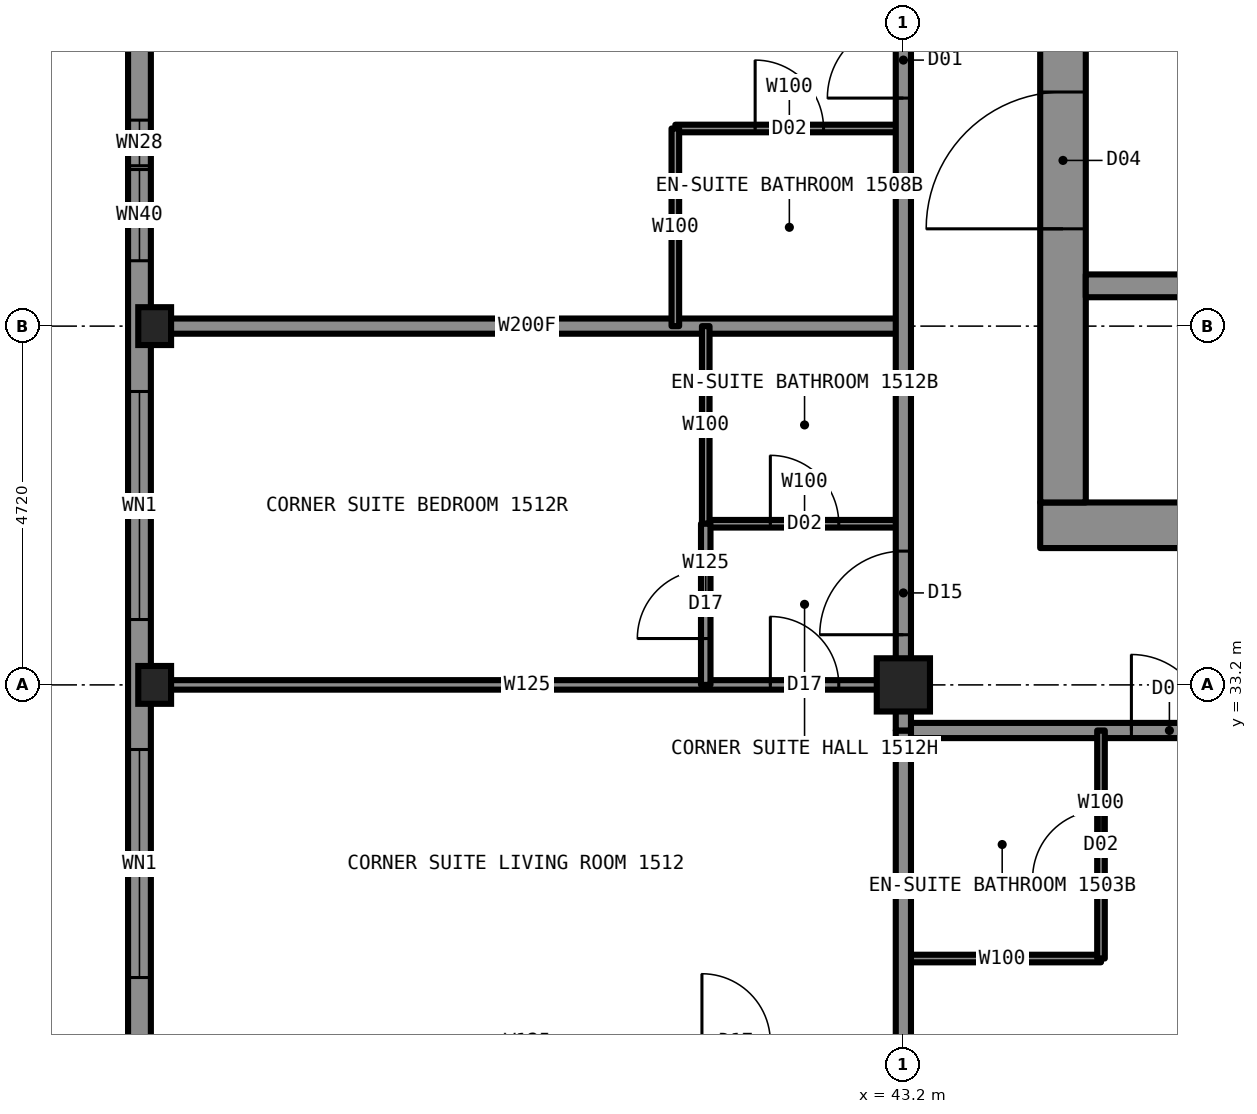
"""IFC4 building model, lengths in metres.
Left out: names, types, materials, properties, quantities, classifications, styles, units other than length and angle.
Written with IfcOpenShell. Run it as: python <this file> out.ifc"""

import sys

from ifc_helpers import new_model, si_unit, direction, frame, frame_2d, origin, origin_2d, place, context, subcontext, project, spatial, rectangle, hollow_rectangle, i_section, extrude, element, fill, save


model = new_model("IFC4")
c1 = context("Model", 3, precision=1e-05, world=origin(), true_north=direction((0.0, 1.0)))
c2 = subcontext(c1, "Body", "Model", "MODEL_VIEW")
j1 = project(units=[si_unit("LENGTHUNIT", "METRE"), si_unit("PLANEANGLEUNIT", "RADIAN")], contexts=[c1])
p1 = place(None, origin())
s1 = spatial("IfcSite", under=j1, at=p1, CompositionType="ELEMENT")
p2 = place(p1, origin())
s2 = spatial("IfcBuilding", under=s1, at=p2, CompositionType="ELEMENT")
p3 = place(p2, frame((0.0, 0.0, 60.0)))
s3 = spatial("IfcBuildingStorey", under=s2, at=p3, CompositionType="ELEMENT", Elevation=60.0)
for number, where, z_axis, x_axis in (
    (1, (33.35, 33.2, 0.0), (0.0, 0.0, 1.0), (1.0, 0.0, 0.0)),
    (2, (33.35, 37.92, 0.0), (0.0, 0.0, 1.0), (1.0, 0.0, 0.0)),
):
    element("IfcColumn", number, at=place(p3, frame(where, z_axis=z_axis, x_axis=x_axis)), inside=s3, PredefinedType="COLUMN", context=c2, shape_type="SweptSolid", body=[
        extrude(i_section(OverallWidth=0.432, OverallDepth=0.498, WebThickness=0.056, FlangeThickness=0.089, at=origin_2d()), origin(), (0.0, 0.0, 1.0), 3.5),
    ])
p4 = place(p3, frame((43.2, 33.2, 0.0), z_axis=(0.0, 0.0, 1.0), x_axis=(1.0, 0.0, 0.0)))
e3 = element("IfcColumn", 3, at=p4, inside=s3, PredefinedType="COLUMN", context=c2, shape_type="SweptSolid", body=[
    extrude(hollow_rectangle(XDim=0.7, YDim=0.7, WallThickness=0.06, at=origin_2d()), origin(), (0.0, 0.0, 1.0), 3.5),
])
p5 = place(p3, frame((45.0, 35.3, 0.0), z_axis=(0.0, 0.0, 1.0), x_axis=(1.0, 0.0, 0.0)))
e4 = element("IfcWall", 4, at=p5, inside=s3, PredefinedType="SHEAR", context=c2, shape_type="SweptSolid", body=[
    extrude(rectangle(XDim=20.0, YDim=0.6, at=frame_2d((10.0, 0.0))), origin(), (0.0, 0.0, 1.0), 3.5),
])
p6 = place(p3, frame((45.3, 35.6, 0.0), z_axis=(0.0, 0.0, 1.0), x_axis=(0.0, 1.0, 0.0)))
e5 = element("IfcWall", 5, at=p6, inside=s3, PredefinedType="SHEAR", context=c2, shape_type="SweptSolid", body=[
    extrude(rectangle(XDim=18.8, YDim=0.6, at=frame_2d((9.4, 0.0))), origin(), (0.0, 0.0, 1.0), 3.5),
])
p7 = place(p6, frame((13.4, 0.0, 0.0)))
e6 = element("IfcOpeningElement", 6, at=p7, cuts=e5, PredefinedType="OPENING", context=c2, shape_type="SweptSolid", body=[
    extrude(rectangle(XDim=1.8, YDim=2.2, at=frame_2d((0.9, 1.1))), frame((0.0, 0.31, 0.0), z_axis=(0.0, -1.0, 0.0), x_axis=(1.0, 0.0, 0.0)), (0.0, 0.0, 1.0), 0.62),
])
p8 = place(p6, frame((3.6, 0.0, 0.0)))
e7 = element("IfcOpeningElement", 7, at=p8, cuts=e5, PredefinedType="OPENING", context=c2, shape_type="SweptSolid", body=[
    extrude(rectangle(XDim=1.8, YDim=2.2, at=frame_2d((0.9, 1.1))), frame((0.0, 0.31, 0.0), z_axis=(0.0, -1.0, 0.0), x_axis=(1.0, 0.0, 0.0)), (0.0, 0.0, 1.0), 0.62),
])
p9 = place(p6, frame((6.4, 0.0, 0.0)))
e8 = element("IfcOpeningElement", 8, at=p9, cuts=e5, PredefinedType="OPENING", context=c2, shape_type="SweptSolid", body=[
    extrude(rectangle(XDim=1.2, YDim=2.2, at=frame_2d((0.6, 1.1))), frame((0.0, 0.31, 0.0), z_axis=(0.0, -1.0, 0.0), x_axis=(1.0, 0.0, 0.0)), (0.0, 0.0, 1.0), 0.62),
])
p10 = place(p3, frame((45.6, 38.45, 0.0), z_axis=(0.0, 0.0, 1.0), x_axis=(1.0, 0.0, 0.0)))
e9 = element("IfcWall", 9, at=p10, inside=s3, PredefinedType="SHEAR", context=c2, shape_type="SweptSolid", body=[
    extrude(rectangle(XDim=18.8, YDim=0.3, at=frame_2d((9.4, 0.0))), origin(), (0.0, 0.0, 1.0), 3.5),
])
p11 = place(p3, frame((33.3, 33.2, 0.0), z_axis=(0.0, 0.0, 1.0), x_axis=(1.0, 0.0, 0.0)))
e10 = element("IfcWall", 10, at=p11, inside=s3, PredefinedType="PARTITIONING", context=c2, shape_type="SweptSolid", body=[
    extrude(rectangle(XDim=9.9, YDim=0.125, at=frame_2d((4.95, 0.0))), origin(), (0.0, 0.0, 1.0), 2.573),
])
p12 = place(p11, frame((8.15, 0.0, 0.0)))
e11 = element("IfcOpeningElement", 11, at=p12, cuts=e10, PredefinedType="OPENING", context=c2, shape_type="SweptSolid", body=[
    extrude(rectangle(XDim=0.9, YDim=2.2, at=frame_2d((0.45, 1.1))), frame((0.0, 0.073, 0.0), z_axis=(0.0, -1.0, 0.0), x_axis=(1.0, 0.0, 0.0)), (0.0, 0.0, 1.0), 0.145),
])
p13 = place(p3, frame((43.2, 32.6, 0.0), z_axis=(0.0, 0.0, 1.0), x_axis=(1.0, 0.0, 0.0)))
e12 = element("IfcWall", 12, at=p13, inside=s3, PredefinedType="PARTITIONING", context=c2, shape_type="SweptSolid", body=[
    extrude(rectangle(XDim=23.6, YDim=0.2, at=frame_2d((11.8, 0.0))), origin(), (0.0, 0.0, 1.0), 3.33),
])
p14 = place(p13, frame((3.0, 0.0, 0.0)))
e13 = element("IfcOpeningElement", 13, at=p14, cuts=e12, PredefinedType="OPENING", context=c2, shape_type="SweptSolid", body=[
    extrude(rectangle(XDim=1.0, YDim=2.2, at=frame_2d((0.5, 1.1))), frame((0.0, 0.11, 0.0), z_axis=(0.0, -1.0, 0.0), x_axis=(1.0, 0.0, 0.0)), (0.0, 0.0, 1.0), 0.22),
])
p15 = place(p13, frame((12.44, 0.0, 0.0)))
e14 = element("IfcOpeningElement", 14, at=p15, cuts=e12, PredefinedType="OPENING", context=c2, shape_type="SweptSolid", body=[
    extrude(rectangle(XDim=1.0, YDim=2.2, at=frame_2d((0.5, 1.1))), frame((0.0, 0.11, 0.0), z_axis=(0.0, -1.0, 0.0), x_axis=(1.0, 0.0, 0.0)), (0.0, 0.0, 1.0), 0.22),
])
p16 = place(p13, frame((20.34, 0.0, 0.0)))
e15 = element("IfcOpeningElement", 15, at=p16, cuts=e12, PredefinedType="OPENING", context=c2, shape_type="SweptSolid", body=[
    extrude(rectangle(XDim=1.0, YDim=2.2, at=frame_2d((0.5, 1.1))), frame((0.0, 0.11, 0.0), z_axis=(0.0, -1.0, 0.0), x_axis=(1.0, 0.0, 0.0)), (0.0, 0.0, 1.0), 0.22),
])
p17 = place(p3, frame((43.2, 29.6, 0.0), z_axis=(0.0, 0.0, 1.0), x_axis=(1.0, 0.0, 0.0)))
e16 = element("IfcWall", 16, at=p17, inside=s3, PredefinedType="PARTITIONING", context=c2, shape_type="SweptSolid", body=[
    extrude(rectangle(XDim=2.6, YDim=0.1, at=frame_2d((1.3, 0.0))), origin(), (0.0, 0.0, 1.0), 3.33),
])
p18 = place(p3, frame((40.2, 40.52, 0.0), z_axis=(0.0, 0.0, 1.0), x_axis=(1.0, 0.0, 0.0)))
e17 = element("IfcWall", 17, at=p18, inside=s3, PredefinedType="PARTITIONING", context=c2, shape_type="SweptSolid", body=[
    extrude(rectangle(XDim=3.0, YDim=0.1, at=frame_2d((1.5, 0.0))), origin(), (0.0, 0.0, 1.0), 3.33),
])
p19 = place(p18, frame((1.05, 0.0, 0.0)))
e18 = element("IfcOpeningElement", 18, at=p19, cuts=e17, PredefinedType="OPENING", context=c2, shape_type="SweptSolid", body=[
    extrude(rectangle(XDim=0.9, YDim=2.1, at=frame_2d((0.45, 1.05))), frame((0.0, 0.06, 0.0), z_axis=(0.0, -1.0, 0.0), x_axis=(1.0, 0.0, 0.0)), (0.0, 0.0, 1.0), 0.12),
])
p20 = place(p3, frame((33.3, 37.92, 0.0), z_axis=(0.0, 0.0, 1.0), x_axis=(1.0, 0.0, 0.0)))
e19 = element("IfcWall", 19, at=p20, inside=s3, PredefinedType="PARTITIONING", context=c2, shape_type="SweptSolid", body=[
    extrude(rectangle(XDim=9.9, YDim=0.2, at=frame_2d((4.95, 0.0))), origin(), (0.0, 0.0, 1.0), 2.573),
])
p21 = place(p3, frame((40.6, 35.32, 0.0), z_axis=(0.0, 0.0, 1.0), x_axis=(1.0, 0.0, 0.0)))
e20 = element("IfcWall", 20, at=p21, inside=s3, PredefinedType="PARTITIONING", context=c2, shape_type="SweptSolid", body=[
    extrude(rectangle(XDim=2.6, YDim=0.1, at=frame_2d((1.3, 0.0))), origin(), (0.0, 0.0, 1.0), 3.33),
])
p22 = place(p21, frame((0.85, 0.0, 0.0)))
e21 = element("IfcOpeningElement", 21, at=p22, cuts=e20, PredefinedType="OPENING", context=c2, shape_type="SweptSolid", body=[
    extrude(rectangle(XDim=0.9, YDim=2.1, at=frame_2d((0.45, 1.05))), frame((0.0, 0.06, 0.0), z_axis=(0.0, -1.0, 0.0), x_axis=(1.0, 0.0, 0.0)), (0.0, 0.0, 1.0), 0.12),
])
p23 = place(p3, frame((43.2, 33.22, 0.0), z_axis=(0.0, 0.0, 1.0), x_axis=(0.0, 1.0, 0.0)))
e22 = element("IfcWall", 22, at=p23, inside=s3, PredefinedType="PARTITIONING", context=c2, shape_type="SweptSolid", body=[
    extrude(rectangle(XDim=23.58, YDim=0.2, at=frame_2d((11.79, 0.0))), origin(), (0.0, 0.0, 1.0), 3.33),
])
p24 = place(p23, frame((7.7, 0.0, 0.0)))
e23 = element("IfcOpeningElement", 23, at=p24, cuts=e22, PredefinedType="OPENING", context=c2, shape_type="SweptSolid", body=[
    extrude(rectangle(XDim=1.0, YDim=2.2, at=frame_2d((0.5, 1.1))), frame((0.0, 0.11, 0.0), z_axis=(0.0, -1.0, 0.0), x_axis=(1.0, 0.0, 0.0)), (0.0, 0.0, 1.0), 0.22),
])
p25 = place(p23, frame((16.4, 0.0, 0.0)))
e24 = element("IfcOpeningElement", 24, at=p25, cuts=e22, PredefinedType="OPENING", context=c2, shape_type="SweptSolid", body=[
    extrude(rectangle(XDim=1.0, YDim=2.2, at=frame_2d((0.5, 1.1))), frame((0.0, 0.11, 0.0), z_axis=(0.0, -1.0, 0.0), x_axis=(1.0, 0.0, 0.0)), (0.0, 0.0, 1.0), 0.22),
])
p26 = place(p23, frame((21.82, 0.0, 0.0)))
e25 = element("IfcOpeningElement", 25, at=p26, cuts=e22, PredefinedType="OPENING", context=c2, shape_type="SweptSolid", body=[
    extrude(rectangle(XDim=1.1, YDim=2.2, at=frame_2d((0.55, 1.1))), frame((0.0, 0.11, 0.0), z_axis=(0.0, -1.0, 0.0), x_axis=(1.0, 0.0, 0.0)), (0.0, 0.0, 1.0), 0.22),
])
p27 = place(p23, frame((0.64, 0.0, 0.0)))
e26 = element("IfcOpeningElement", 26, at=p27, cuts=e22, PredefinedType="OPENING", context=c2, shape_type="SweptSolid", body=[
    extrude(rectangle(XDim=1.1, YDim=2.2, at=frame_2d((0.55, 1.1))), frame((0.0, 0.11, 0.0), z_axis=(0.0, -1.0, 0.0), x_axis=(1.0, 0.0, 0.0)), (0.0, 0.0, 1.0), 0.22),
])
p28 = place(p3, frame((43.2, 23.3, 0.0), z_axis=(0.0, 0.0, 1.0), x_axis=(0.0, 1.0, 0.0)))
e27 = element("IfcWall", 27, at=p28, inside=s3, PredefinedType="PARTITIONING", context=c2, shape_type="SweptSolid", body=[
    extrude(rectangle(XDim=9.3, YDim=0.2, at=frame_2d((4.65, 0.0))), origin(), (0.0, 0.0, 1.0), 2.573),
])
p29 = place(p3, frame((40.6, 35.32, 0.0), z_axis=(0.0, 0.0, 1.0), x_axis=(0.0, 1.0, 0.0)))
e28 = element("IfcWall", 28, at=p29, inside=s3, PredefinedType="PARTITIONING", context=c2, shape_type="SweptSolid", body=[
    extrude(rectangle(XDim=2.6, YDim=0.1, at=frame_2d((1.3, 0.0))), origin(), (0.0, 0.0, 1.0), 3.33),
])
p30 = place(p3, frame((40.6, 33.2, 0.0), z_axis=(0.0, 0.0, 1.0), x_axis=(0.0, 1.0, 0.0)))
e29 = element("IfcWall", 29, at=p30, inside=s3, PredefinedType="PARTITIONING", context=c2, shape_type="SweptSolid", body=[
    extrude(rectangle(XDim=2.12, YDim=0.125, at=frame_2d((1.06, 0.0))), origin(), (0.0, 0.0, 1.0), 3.33),
])
p31 = place(p30, frame((0.61, 0.0, 0.0)))
e30 = element("IfcOpeningElement", 30, at=p31, cuts=e29, PredefinedType="OPENING", context=c2, shape_type="SweptSolid", body=[
    extrude(rectangle(XDim=0.9, YDim=2.2, at=frame_2d((0.45, 1.1))), frame((0.0, 0.073, 0.0), z_axis=(0.0, -1.0, 0.0), x_axis=(1.0, 0.0, 0.0)), (0.0, 0.0, 1.0), 0.145),
])
p32 = place(p3, frame((40.2, 37.92, 0.0), z_axis=(0.0, 0.0, 1.0), x_axis=(0.0, 1.0, 0.0)))
e31 = element("IfcWall", 31, at=p32, inside=s3, PredefinedType="PARTITIONING", context=c2, shape_type="SweptSolid", body=[
    extrude(rectangle(XDim=2.6, YDim=0.1, at=frame_2d((1.3, 0.0))), origin(), (0.0, 0.0, 1.0), 3.33),
])
p33 = place(p3, frame((45.8, 29.6, 0.0), z_axis=(0.0, 0.0, 1.0), x_axis=(0.0, 1.0, 0.0)))
e32 = element("IfcWall", 32, at=p33, inside=s3, PredefinedType="PARTITIONING", context=c2, shape_type="SweptSolid", body=[
    extrude(rectangle(XDim=3.0, YDim=0.1, at=frame_2d((1.5, 0.0))), origin(), (0.0, 0.0, 1.0), 3.33),
])
p34 = place(p33, frame((1.05, 0.0, 0.0)))
e33 = element("IfcOpeningElement", 33, at=p34, cuts=e32, PredefinedType="OPENING", context=c2, shape_type="SweptSolid", body=[
    extrude(rectangle(XDim=0.9, YDim=2.1, at=frame_2d((0.45, 1.05))), frame((0.0, 0.06, 0.0), z_axis=(0.0, -1.0, 0.0), x_axis=(1.0, 0.0, 0.0)), (0.0, 0.0, 1.0), 0.12),
])
p35 = place(p3, frame((33.15, 61.5, 0.0), z_axis=(0.0, 0.0, 1.0), x_axis=(0.0, -1.0, 0.0)))
e34 = element("IfcWall", 34, at=p35, inside=s3, PredefinedType="SOLIDWALL", context=c2, shape_type="SweptSolid", body=[
    extrude(rectangle(XDim=33.0, YDim=0.3, at=frame_2d((16.5, 0.0))), origin(), (0.0, 0.0, 1.0), 2.83),
])
p36 = place(p35, frame((0.85, 0.0, 0.5)))
e35 = element("IfcOpeningElement", 35, at=p36, cuts=e34, PredefinedType="OPENING", context=c2, shape_type="SweptSolid", body=[
    extrude(rectangle(XDim=3.0, YDim=2.0, at=frame_2d((1.5, 1.0))), frame((0.0, 0.16, 0.0), z_axis=(0.0, -1.0, 0.0), x_axis=(1.0, 0.0, 0.0)), (0.0, 0.0, 1.0), 0.32),
])
p37 = place(p35, frame((5.56, 0.0, 0.5)))
e36 = element("IfcOpeningElement", 36, at=p37, cuts=e34, PredefinedType="OPENING", context=c2, shape_type="SweptSolid", body=[
    extrude(rectangle(XDim=3.0, YDim=2.0, at=frame_2d((1.5, 1.0))), frame((0.0, 0.16, 0.0), z_axis=(0.0, -1.0, 0.0), x_axis=(1.0, 0.0, 0.0)), (0.0, 0.0, 1.0), 0.32),
])
p38 = place(p35, frame((10.28, 0.0, 0.5)))
e37 = element("IfcOpeningElement", 37, at=p38, cuts=e34, PredefinedType="OPENING", context=c2, shape_type="SweptSolid", body=[
    extrude(rectangle(XDim=1.2, YDim=1.7, at=frame_2d((0.6, 0.85))), frame((0.0, 0.16, 0.0), z_axis=(0.0, -1.0, 0.0), x_axis=(1.0, 0.0, 0.0)), (0.0, 0.0, 1.0), 0.32),
])
p39 = place(p35, frame((15.0, 0.0, 0.5)))
e38 = element("IfcOpeningElement", 38, at=p39, cuts=e34, PredefinedType="OPENING", context=c2, shape_type="SweptSolid", body=[
    extrude(rectangle(XDim=3.0, YDim=2.0, at=frame_2d((1.5, 1.0))), frame((0.0, 0.16, 0.0), z_axis=(0.0, -1.0, 0.0), x_axis=(1.0, 0.0, 0.0)), (0.0, 0.0, 1.0), 0.32),
])
p40 = place(p35, frame((21.52, 0.0, 0.5)))
e39 = element("IfcOpeningElement", 39, at=p40, cuts=e34, PredefinedType="OPENING", context=c2, shape_type="SweptSolid", body=[
    extrude(rectangle(XDim=1.2, YDim=1.7, at=frame_2d((0.6, 0.85))), frame((0.0, 0.16, 0.0), z_axis=(0.0, -1.0, 0.0), x_axis=(1.0, 0.0, 0.0)), (0.0, 0.0, 1.0), 0.32),
])
p41 = place(p35, frame((24.44, 0.0, 0.5)))
e40 = element("IfcOpeningElement", 40, at=p41, cuts=e34, PredefinedType="OPENING", context=c2, shape_type="SweptSolid", body=[
    extrude(rectangle(XDim=3.0, YDim=2.0, at=frame_2d((1.5, 1.0))), frame((0.0, 0.16, 0.0), z_axis=(0.0, -1.0, 0.0), x_axis=(1.0, 0.0, 0.0)), (0.0, 0.0, 1.0), 0.32),
])
p42 = place(p35, frame((29.15, 0.0, 0.5)))
e41 = element("IfcOpeningElement", 41, at=p42, cuts=e34, PredefinedType="OPENING", context=c2, shape_type="SweptSolid", body=[
    extrude(rectangle(XDim=3.0, YDim=2.0, at=frame_2d((1.5, 1.0))), frame((0.0, 0.16, 0.0), z_axis=(0.0, -1.0, 0.0), x_axis=(1.0, 0.0, 0.0)), (0.0, 0.0, 1.0), 0.32),
])
p43 = place(p35, frame((11.48, 0.0, 0.5)))
e42 = element("IfcOpeningElement", 42, at=p43, cuts=e34, PredefinedType="OPENING", context=c2, shape_type="SweptSolid", body=[
    extrude(rectangle(XDim=0.6, YDim=0.8, at=frame_2d((0.3, 0.4))), frame((0.0, 0.16, 0.0), z_axis=(0.0, -1.0, 0.0), x_axis=(1.0, 0.0, 0.0)), (0.0, 0.0, 1.0), 0.32),
])
p44 = place(p35, frame((20.87, 0.0, 0.5)))
e43 = element("IfcOpeningElement", 43, at=p44, cuts=e34, PredefinedType="OPENING", context=c2, shape_type="SweptSolid", body=[
    extrude(rectangle(XDim=0.6, YDim=0.8, at=frame_2d((0.3, 0.4))), frame((0.0, 0.16, 0.0), z_axis=(0.0, -1.0, 0.0), x_axis=(1.0, 0.0, 0.0)), (0.0, 0.0, 1.0), 0.32),
])
p45 = place(p3, frame((43.2, 32.6, 0.0), z_axis=(0.0, 0.0, 1.0), x_axis=(0.0, 1.0, 0.0)))
e44 = element("IfcWall", 44, at=p45, inside=s3, PredefinedType="PARTITIONING", context=c2, shape_type="SweptSolid", body=[
    extrude(rectangle(XDim=0.62, YDim=0.2, at=frame_2d((0.31, 0.0))), origin(), (0.0, 0.0, 1.0), 2.573),
])
p46 = place(p14, origin())
e45 = element("IfcDoor", 45, at=p46, inside=s3, OperationType="SINGLE_SWING_LEFT", PredefinedType="DOOR", context=c2, shape_type="SweptSolid", body=[
    extrude(rectangle(XDim=1.0, YDim=2.2, at=frame_2d((0.5, 1.1))), frame((0.0, 0.025, 0.0), z_axis=(0.0, -1.0, 0.0), x_axis=(1.0, 0.0, 0.0)), (0.0, 0.0, 1.0), 0.05),
])
fill(e13, e45)
p47 = place(p34, origin())
e46 = element("IfcDoor", 46, at=p47, inside=s3, OperationType="SINGLE_SWING_RIGHT", PredefinedType="DOOR", context=c2, shape_type="SweptSolid", body=[
    extrude(rectangle(XDim=0.9, YDim=2.1, at=frame_2d((0.45, 1.05))), frame((0.0, 0.025, 0.0), z_axis=(0.0, -1.0, 0.0), x_axis=(1.0, 0.0, 0.0)), (0.0, 0.0, 1.0), 0.05),
])
fill(e33, e46)
p48 = place(p24, origin())
e47 = element("IfcDoor", 47, at=p48, inside=s3, OperationType="SINGLE_SWING_LEFT", PredefinedType="DOOR", context=c2, shape_type="SweptSolid", body=[
    extrude(rectangle(XDim=1.0, YDim=2.2, at=frame_2d((0.5, 1.1))), frame((0.0, 0.025, 0.0), z_axis=(0.0, -1.0, 0.0), x_axis=(1.0, 0.0, 0.0)), (0.0, 0.0, 1.0), 0.05),
])
fill(e23, e47)
p49 = place(p19, origin())
e48 = element("IfcDoor", 48, at=p49, inside=s3, OperationType="SINGLE_SWING_RIGHT", PredefinedType="DOOR", context=c2, shape_type="SweptSolid", body=[
    extrude(rectangle(XDim=0.9, YDim=2.1, at=frame_2d((0.45, 1.05))), frame((0.0, 0.025, 0.0), z_axis=(0.0, -1.0, 0.0), x_axis=(1.0, 0.0, 0.0)), (0.0, 0.0, 1.0), 0.05),
])
fill(e18, e48)
p50 = place(p12, origin())
e49 = element("IfcDoor", 49, at=p50, inside=s3, OperationType="SINGLE_SWING_LEFT", PredefinedType="DOOR", context=c2, shape_type="SweptSolid", body=[
    extrude(rectangle(XDim=0.9, YDim=2.2, at=frame_2d((0.45, 1.1))), frame((0.0, 0.025, 0.0), z_axis=(0.0, -1.0, 0.0), x_axis=(1.0, 0.0, 0.0)), (0.0, 0.0, 1.0), 0.05),
])
fill(e11, e49)
p51 = place(p22, origin())
e50 = element("IfcDoor", 50, at=p51, inside=s3, OperationType="SINGLE_SWING_RIGHT", PredefinedType="DOOR", context=c2, shape_type="SweptSolid", body=[
    extrude(rectangle(XDim=0.9, YDim=2.1, at=frame_2d((0.45, 1.05))), frame((0.0, 0.025, 0.0), z_axis=(0.0, -1.0, 0.0), x_axis=(1.0, 0.0, 0.0)), (0.0, 0.0, 1.0), 0.05),
])
fill(e21, e50)
p52 = place(p27, origin())
e51 = element("IfcDoor", 51, at=p52, inside=s3, OperationType="SINGLE_SWING_LEFT", PredefinedType="DOOR", context=c2, shape_type="SweptSolid", body=[
    extrude(rectangle(XDim=1.1, YDim=2.2, at=frame_2d((0.55, 1.1))), frame((0.0, 0.025, 0.0), z_axis=(0.0, -1.0, 0.0), x_axis=(1.0, 0.0, 0.0)), (0.0, 0.0, 1.0), 0.05),
])
fill(e26, e51)
p53 = place(p31, origin())
e52 = element("IfcDoor", 52, at=p53, inside=s3, OperationType="SINGLE_SWING_LEFT", PredefinedType="DOOR", context=c2, shape_type="SweptSolid", body=[
    extrude(rectangle(XDim=0.9, YDim=2.2, at=frame_2d((0.45, 1.1))), frame((0.0, 0.025, 0.0), z_axis=(0.0, -1.0, 0.0), x_axis=(1.0, 0.0, 0.0)), (0.0, 0.0, 1.0), 0.05),
])
fill(e30, e52)
p54 = place(p40, origin())
e53 = element("IfcWindow", 53, at=p54, inside=s3, PartitioningType="SINGLE_PANEL", PredefinedType="WINDOW", context=c2, shape_type="SweptSolid", body=[
    extrude(rectangle(XDim=1.2, YDim=1.7, at=frame_2d((0.6, 0.85))), frame((0.0, 0.03, 0.0), z_axis=(0.0, -1.0, 0.0), x_axis=(1.0, 0.0, 0.0)), (0.0, 0.0, 1.0), 0.06),
])
fill(e39, e53)
p55 = place(p41, origin())
e54 = element("IfcWindow", 54, at=p55, inside=s3, PartitioningType="SINGLE_PANEL", PredefinedType="WINDOW", context=c2, shape_type="SweptSolid", body=[
    extrude(rectangle(XDim=3.0, YDim=2.0, at=frame_2d((1.5, 1.0))), frame((0.0, 0.03, 0.0), z_axis=(0.0, -1.0, 0.0), x_axis=(1.0, 0.0, 0.0)), (0.0, 0.0, 1.0), 0.06),
])
fill(e40, e54)
p56 = place(p42, origin())
e55 = element("IfcWindow", 55, at=p56, inside=s3, PartitioningType="SINGLE_PANEL", PredefinedType="WINDOW", context=c2, shape_type="SweptSolid", body=[
    extrude(rectangle(XDim=3.0, YDim=2.0, at=frame_2d((1.5, 1.0))), frame((0.0, 0.03, 0.0), z_axis=(0.0, -1.0, 0.0), x_axis=(1.0, 0.0, 0.0)), (0.0, 0.0, 1.0), 0.06),
])
fill(e41, e55)
p57 = place(p8, origin())
e56 = element("IfcDoor", 56, at=p57, inside=s3, OperationType="DOUBLE_DOOR_SINGLE_SWING", PredefinedType="DOOR", context=c2, shape_type="SweptSolid", body=[
    extrude(rectangle(XDim=1.8, YDim=2.2, at=frame_2d((0.9, 1.1))), frame((0.0, 0.025, 0.0), z_axis=(0.0, -1.0, 0.0), x_axis=(1.0, 0.0, 0.0)), (0.0, 0.0, 1.0), 0.05),
])
fill(e7, e56)
p58 = place(p44, origin())
e57 = element("IfcWindow", 57, at=p58, inside=s3, PartitioningType="SINGLE_PANEL", PredefinedType="WINDOW", context=c2, shape_type="SweptSolid", body=[
    extrude(rectangle(XDim=0.6, YDim=0.8, at=frame_2d((0.3, 0.4))), frame((0.0, 0.03, 0.0), z_axis=(0.0, -1.0, 0.0), x_axis=(1.0, 0.0, 0.0)), (0.0, 0.0, 1.0), 0.06),
])
fill(e43, e57)
save(model, sys.argv[1])
